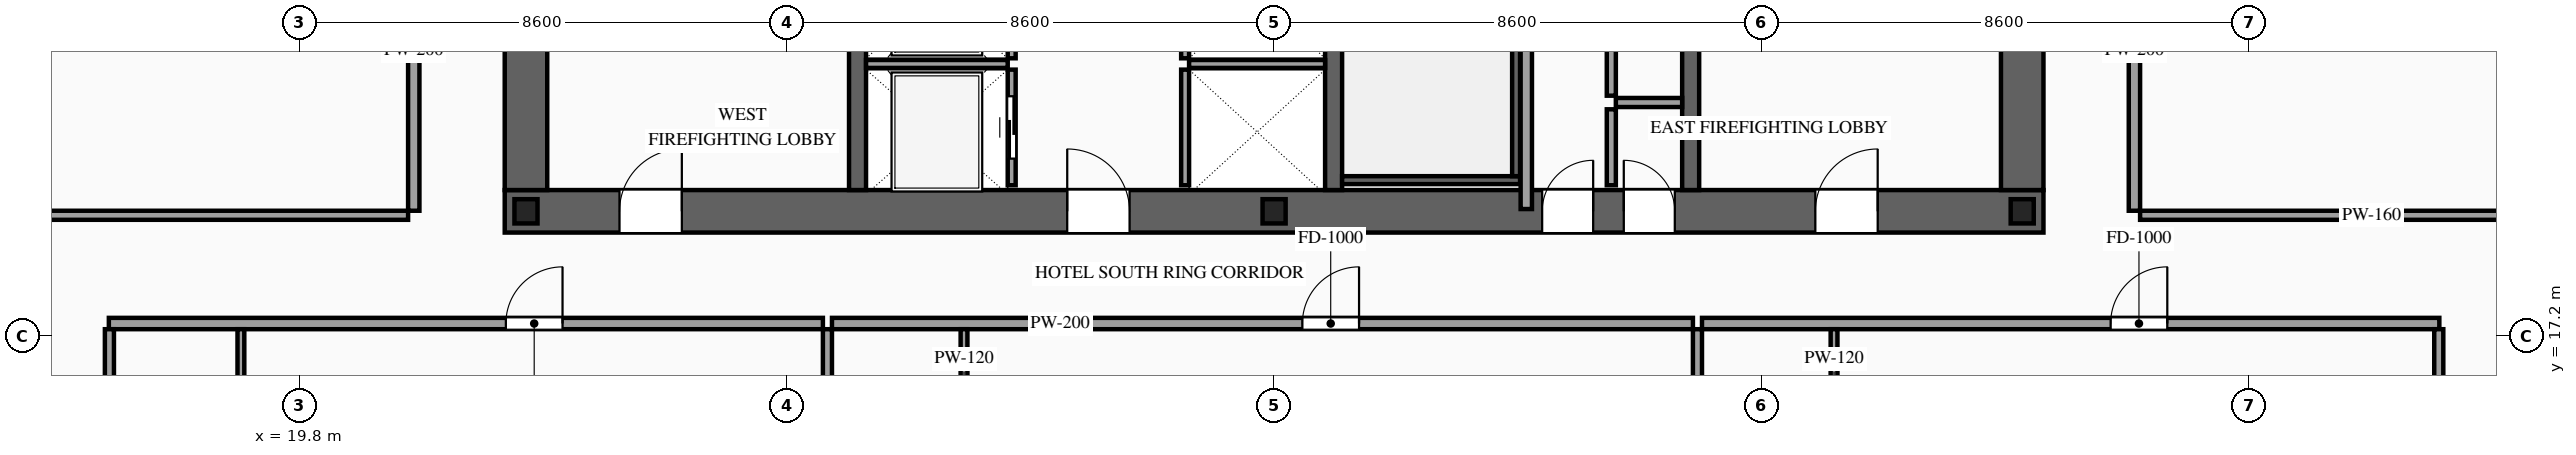
"""IFC4 building model, lengths in metres.
Left out: names, types, materials, properties, quantities, classifications, styles, units other than length and angle.
Written with IfcOpenShell. Run it as: python <this file> out.ifc"""

import sys

from ifc_helpers import new_model, si_unit, direction, frame, frame_2d, origin, origin_2d, place, context, subcontext, project, spatial, rectangle, i_section, extrude, source, transform, mapped, element, fill, save


model = new_model("IFC4")
c1 = context("Model", 3, precision=1e-05, world=origin(), true_north=direction((0.0, 1.0)))
c2 = subcontext(c1, "Body", "Model", "MODEL_VIEW")
j1 = project(units=[si_unit("LENGTHUNIT", "METRE"), si_unit("PLANEANGLEUNIT", "RADIAN")], contexts=[c1])
p1 = place(None, origin())
s1 = spatial("IfcSite", under=j1, at=p1, CompositionType="ELEMENT")
p2 = place(p1, origin())
s2 = spatial("IfcBuilding", under=s1, at=p2, CompositionType="ELEMENT")
p3 = place(p2, frame((0.0, 0.0, 101.0)))
s3 = spatial("IfcBuildingStorey", under=s2, at=p3, CompositionType="ELEMENT", Elevation=101.0)
p4 = place(p3, frame((23.425, 19.4, 0.0), z_axis=(0.0, 0.0, 1.0), x_axis=(1.0, 0.0, 0.0)))
e1 = element("IfcWall", 1, at=p4, inside=s3, PredefinedType="SHEAR", context=c2, shape_type="SweptSolid", body=[
    extrude(rectangle(XDim=27.15, YDim=0.75, at=frame_2d((13.575, 0.0))), origin(), (0.0, 0.0, 1.0), 3.6),
])
p5 = place(p4, frame((2.025, 0.0, 0.0)))
e2 = element("IfcOpeningElement", 2, at=p5, cuts=e1, PredefinedType="OPENING", context=c2, shape_type="SweptSolid", body=[
    extrude(rectangle(XDim=1.1, YDim=2.2, at=frame_2d((0.55, 1.1))), frame((0.0, 0.39, 0.0), z_axis=(0.0, -1.0, 0.0), x_axis=(1.0, 0.0, 0.0)), (0.0, 0.0, 1.0), 0.78),
])
p6 = place(p4, frame((9.925, 0.0, 0.0)))
e3 = element("IfcOpeningElement", 3, at=p6, cuts=e1, PredefinedType="OPENING", context=c2, shape_type="SweptSolid", body=[
    extrude(rectangle(XDim=1.1, YDim=2.2, at=frame_2d((0.55, 1.1))), frame((0.0, 0.39, 0.0), z_axis=(0.0, -1.0, 0.0), x_axis=(1.0, 0.0, 0.0)), (0.0, 0.0, 1.0), 0.78),
])
p7 = place(p4, frame((23.125, 0.0, 0.0)))
e4 = element("IfcOpeningElement", 4, at=p7, cuts=e1, PredefinedType="OPENING", context=c2, shape_type="SweptSolid", body=[
    extrude(rectangle(XDim=1.1, YDim=2.2, at=frame_2d((0.55, 1.1))), frame((0.0, 0.39, 0.0), z_axis=(0.0, -1.0, 0.0), x_axis=(1.0, 0.0, 0.0)), (0.0, 0.0, 1.0), 0.78),
])
p8 = place(p4, frame((19.745, 0.0, 0.0)))
e5 = element("IfcOpeningElement", 5, at=p8, cuts=e1, PredefinedType="OPENING", context=c2, shape_type="SweptSolid", body=[
    extrude(rectangle(XDim=0.9, YDim=2.15, at=frame_2d((0.45, 1.075))), frame((0.0, 0.39, 0.0), z_axis=(0.0, -1.0, 0.0), x_axis=(1.0, 0.0, 0.0)), (0.0, 0.0, 1.0), 0.78),
])
p9 = place(p4, frame((18.305, 0.0, 0.0)))
e6 = element("IfcOpeningElement", 6, at=p9, cuts=e1, PredefinedType="OPENING", context=c2, shape_type="SweptSolid", body=[
    extrude(rectangle(XDim=0.9, YDim=2.15, at=frame_2d((0.45, 1.075))), frame((0.0, 0.39, 0.0), z_axis=(0.0, -1.0, 0.0), x_axis=(1.0, 0.0, 0.0)), (0.0, 0.0, 1.0), 0.78),
])
m1 = source(origin(), c2, "Body", "SweptSolid", [
    extrude(rectangle(XDim=12.05, YDim=0.75, at=frame_2d((6.025, 0.0))), origin(), (0.0, 0.0, 1.0), 3.6),
])
for number, where, z_axis, x_axis in (
    (7, (23.8, 19.775, 0.0), (0.0, 0.0, 1.0), (0.0, 1.0, 0.0)),
    (8, (50.2, 19.775, 0.0), (0.0, 0.0, 1.0), (0.0, 1.0, 0.0)),
):
    element("IfcWall", number, at=place(p3, frame(where, z_axis=z_axis, x_axis=x_axis)), inside=s3, PredefinedType="SHEAR", context=c2, shape_type="MappedRepresentation", body=[
        mapped(m1, transform((0.0, 0.0, 0.0), scale=1.0)),
    ])
m2 = source(origin(), c2, "Body", "SweptSolid", [
    extrude(rectangle(XDim=12.05, YDim=0.3, at=frame_2d((6.025, 0.0))), origin(), (0.0, 0.0, 1.0), 3.6),
])
for number, where, z_axis, x_axis in (
    (9, (29.65, 19.775, 0.0), (0.0, 0.0, 1.0), (0.0, 1.0, 0.0)),
    (10, (38.05, 19.775, 0.0), (0.0, 0.0, 1.0), (0.0, 1.0, 0.0)),
    (11, (44.35, 19.775, 0.0), (0.0, 0.0, 1.0), (0.0, 1.0, 0.0)),
):
    element("IfcWall", number, at=place(p3, frame(where, z_axis=z_axis, x_axis=x_axis)), inside=s3, PredefinedType="SOLIDWALL", context=c2, shape_type="MappedRepresentation", body=[
        mapped(m2, transform((0.0, 0.0, 0.0), scale=1.0)),
    ])
m3 = source(origin(), c2, "Body", "SweptSolid", [
    extrude(i_section(OverallWidth=0.407, OverallDepth=0.428, WebThickness=0.02, FlangeThickness=0.035, at=origin_2d()), origin(), (0.0, 0.0, 1.0), 3.6),
])
for number, where, z_axis, x_axis in (
    (12, (23.8, 19.4, 0.0), (0.0, 0.0, 1.0), (1.0, 0.0, 0.0)),
    (13, (37.0, 19.4, 0.0), (0.0, 0.0, 1.0), (1.0, 0.0, 0.0)),
    (14, (50.2, 19.4, 0.0), (0.0, 0.0, 1.0), (1.0, 0.0, 0.0)),
):
    element("IfcColumn", number, at=place(p3, frame(where, z_axis=z_axis, x_axis=x_axis)), inside=s3, PredefinedType="COLUMN", context=c2, shape_type="MappedRepresentation", body=[
        mapped(m3, transform((0.0, 0.0, 0.0), scale=1.0)),
    ])
p10 = place(p3, frame((32.37, 19.86, 0.0), z_axis=(0.0, 0.0, 1.0), x_axis=(0.0, 1.0, 0.0)))
e15 = element("IfcWall", 15, at=p10, inside=s3, PredefinedType="SOLIDWALL", context=c2, shape_type="SweptSolid", body=[
    extrude(rectangle(XDim=2.04, YDim=0.14, at=frame_2d((1.02, 0.0))), origin(), (0.0, 0.0, 1.0), 3.38),
])
p11 = place(p10, frame((0.47, 0.0, 0.0)))
e16 = element("IfcOpeningElement", 16, at=p11, cuts=e15, PredefinedType="OPENING", context=c2, shape_type="SweptSolid", body=[
    extrude(rectangle(XDim=1.1, YDim=2.2, at=frame_2d((0.55, 1.1))), frame((0.0, 0.085, 0.0), z_axis=(0.0, -1.0, 0.0), x_axis=(1.0, 0.0, 0.0)), (0.0, 0.0, 1.0), 0.17),
])
m4 = source(origin(), c2, "Body", "SweptSolid", [
    extrude(rectangle(XDim=2.5, YDim=0.14, at=frame_2d((1.25, 0.0))), origin(), (0.0, 0.0, 1.0), 3.38),
])
p12 = place(p3, frame((29.8, 22.0, 0.0), z_axis=(0.0, 0.0, 1.0), x_axis=(1.0, 0.0, 0.0)))
e17 = element("IfcWall", 17, at=p12, inside=s3, PredefinedType="SOLIDWALL", context=c2, shape_type="MappedRepresentation", body=[
    mapped(m4, transform((0.0, 0.0, 0.0), scale=1.0)),
])
p13 = place(p3, frame((32.37, 22.1, 0.0), z_axis=(0.0, 0.0, 1.0), x_axis=(0.0, 1.0, 0.0)))
e18 = element("IfcWall", 18, at=p13, inside=s3, PredefinedType="SOLIDWALL", context=c2, shape_type="SweptSolid", body=[
    extrude(rectangle(XDim=2.2, YDim=0.14, at=frame_2d((1.1, 0.0))), origin(), (0.0, 0.0, 1.0), 3.38),
])
p14 = place(p13, frame((0.55, 0.0, 0.0)))
e19 = element("IfcOpeningElement", 19, at=p14, cuts=e18, PredefinedType="OPENING", context=c2, shape_type="SweptSolid", body=[
    extrude(rectangle(XDim=1.1, YDim=2.2, at=frame_2d((0.55, 1.1))), frame((0.0, 0.085, 0.0), z_axis=(0.0, -1.0, 0.0), x_axis=(1.0, 0.0, 0.0)), (0.0, 0.0, 1.0), 0.17),
])
m5 = source(origin(), c2, "Body", "SweptSolid", [
    extrude(rectangle(XDim=2.04, YDim=0.14, at=frame_2d((1.02, 0.0))), origin(), (0.0, 0.0, 1.0), 3.38),
])
p15 = place(p3, frame((35.43, 19.86, 0.0), z_axis=(0.0, 0.0, 1.0), x_axis=(0.0, 1.0, 0.0)))
e20 = element("IfcWall", 20, at=p15, inside=s3, PredefinedType="SOLIDWALL", context=c2, shape_type="MappedRepresentation", body=[
    mapped(m5, transform((0.0, 0.0, 0.0), scale=1.0)),
])
m6 = source(origin(), c2, "Body", "SweptSolid", [
    extrude(rectangle(XDim=2.4, YDim=0.14, at=frame_2d((1.2, 0.0))), origin(), (0.0, 0.0, 1.0), 3.38),
])
p16 = place(p3, frame((35.5, 22.0, 0.0), z_axis=(0.0, 0.0, 1.0), x_axis=(1.0, 0.0, 0.0)))
e21 = element("IfcWall", 21, at=p16, inside=s3, PredefinedType="SOLIDWALL", context=c2, shape_type="MappedRepresentation", body=[
    mapped(m6, transform((0.0, 0.0, 0.0), scale=1.0)),
])
m7 = source(origin(), c2, "Body", "SweptSolid", [
    extrude(rectangle(XDim=2.2, YDim=0.14, at=frame_2d((1.1, 0.0))), origin(), (0.0, 0.0, 1.0), 3.38),
])
p17 = place(p3, frame((35.43, 22.1, 0.0), z_axis=(0.0, 0.0, 1.0), x_axis=(0.0, 1.0, 0.0)))
e22 = element("IfcWall", 22, at=p17, inside=s3, PredefinedType="SOLIDWALL", context=c2, shape_type="MappedRepresentation", body=[
    mapped(m7, transform((0.0, 0.0, 0.0), scale=1.0)),
])
m8 = source(origin(), c2, "Body", "SweptSolid", [
    extrude(rectangle(XDim=3.14, YDim=0.14, at=frame_2d((1.57, 0.0))), origin(), (0.0, 0.0, 1.0), 3.38),
])
p18 = place(p3, frame((38.2, 19.95, 0.0), z_axis=(0.0, 0.0, 1.0), x_axis=(1.0, 0.0, 0.0)))
e23 = element("IfcWall", 23, at=p18, inside=s3, PredefinedType="SOLIDWALL", context=c2, shape_type="MappedRepresentation", body=[
    mapped(m8, transform((0.0, 0.0, 0.0), scale=1.0)),
])
m9 = source(origin(), c2, "Body", "SweptSolid", [
    extrude(rectangle(XDim=8.94, YDim=0.14, at=frame_2d((4.47, 0.0))), origin(), (0.0, 0.0, 1.0), 3.38),
])
p19 = place(p3, frame((41.27, 20.02, 0.0), z_axis=(0.0, 0.0, 1.0), x_axis=(0.0, 1.0, 0.0)))
e24 = element("IfcWall", 24, at=p19, inside=s3, PredefinedType="SOLIDWALL", context=c2, shape_type="MappedRepresentation", body=[
    mapped(m9, transform((0.0, 0.0, 0.0), scale=1.0)),
])
m10 = source(origin(), c2, "Body", "SweptSolid", [
    extrude(rectangle(XDim=1.34, YDim=0.16, at=frame_2d((0.67, 0.0))), origin(), (0.0, 0.0, 1.0), 3.38),
])
p20 = place(p3, frame((42.95, 19.86, 0.0), z_axis=(0.0, 0.0, 1.0), x_axis=(0.0, 1.0, 0.0)))
e25 = element("IfcWall", 25, at=p20, inside=s3, PredefinedType="PARTITIONING", context=c2, shape_type="MappedRepresentation", body=[
    mapped(m10, transform((0.0, 0.0, 0.0), scale=1.0)),
])
m11 = source(origin(), c2, "Body", "SweptSolid", [
    extrude(rectangle(XDim=1.17, YDim=0.16, at=frame_2d((0.585, 0.0))), origin(), (0.0, 0.0, 1.0), 3.38),
])
p21 = place(p3, frame((43.03, 21.32, 0.0), z_axis=(0.0, 0.0, 1.0), x_axis=(1.0, 0.0, 0.0)))
e26 = element("IfcWall", 26, at=p21, inside=s3, PredefinedType="PARTITIONING", context=c2, shape_type="MappedRepresentation", body=[
    mapped(m11, transform((0.0, 0.0, 0.0), scale=1.0)),
])
m12 = source(origin(), c2, "Body", "SweptSolid", [
    extrude(rectangle(XDim=12.72, YDim=0.2, at=frame_2d((6.36, 0.0))), origin(), (0.0, 0.0, 1.0), 3.38),
])
p22 = place(p3, frame((41.45, 19.44, 0.0), z_axis=(0.0, 0.0, 1.0), x_axis=(0.0, 1.0, 0.0)))
e27 = element("IfcWall", 27, at=p22, inside=s3, PredefinedType="PARTITIONING", context=c2, shape_type="MappedRepresentation", body=[
    mapped(m12, transform((0.0, 0.0, 0.0), scale=1.0)),
])
m13 = source(origin(), c2, "Body", "SweptSolid", [
    extrude(rectangle(XDim=10.72, YDim=0.16, at=frame_2d((5.36, 0.0))), origin(), (0.0, 0.0, 1.0), 3.38),
])
p23 = place(p3, frame((42.95, 21.44, 0.0), z_axis=(0.0, 0.0, 1.0), x_axis=(0.0, 1.0, 0.0)))
e28 = element("IfcWall", 28, at=p23, inside=s3, PredefinedType="PARTITIONING", context=c2, shape_type="MappedRepresentation", body=[
    mapped(m13, transform((0.0, 0.0, 0.0), scale=1.0)),
])
p24 = place(p3, frame((16.44, 17.42, 0.0), z_axis=(0.0, 0.0, 1.0), x_axis=(1.0, 0.0, 0.0)))
e29 = element("IfcWall", 29, at=p24, inside=s3, PredefinedType="PARTITIONING", context=c2, shape_type="SweptSolid", body=[
    extrude(rectangle(XDim=12.599, YDim=0.2, at=frame_2d((6.3, 0.0))), origin(), (0.0, 0.0, 1.0), 3.38),
])
p25 = place(p24, frame((7.005, 0.0, 0.0)))
e30 = element("IfcOpeningElement", 30, at=p25, cuts=e29, PredefinedType="OPENING", context=c2, shape_type="SweptSolid", body=[
    extrude(rectangle(XDim=1.0, YDim=2.2, at=frame_2d((0.5, 1.1))), frame((0.0, 0.115, 0.0), z_axis=(0.0, -1.0, 0.0), x_axis=(1.0, 0.0, 0.0)), (0.0, 0.0, 1.0), 0.23),
])
m14 = source(origin(), c2, "Body", "SweptSolid", [
    extrude(rectangle(XDim=14.97, YDim=0.16, at=frame_2d((7.485, 0.0))), origin(), (0.0, 0.0, 1.0), 3.38),
])
p26 = place(p3, frame((29.119, 2.35, 0.0), z_axis=(0.0, 0.0, 1.0), x_axis=(0.0, 1.0, 0.0)))
e31 = element("IfcWall", 31, at=p26, inside=s3, PredefinedType="PARTITIONING", context=c2, shape_type="MappedRepresentation", body=[
    mapped(m14, transform((0.0, 0.0, 0.0), scale=1.0)),
])
m15 = source(origin(), c2, "Body", "SweptSolid", [
    extrude(rectangle(XDim=2.42, YDim=0.12, at=frame_2d((1.21, 0.0))), origin(), (0.0, 0.0, 1.0), 3.38),
])
p27 = place(p3, frame((18.77, 14.9, 0.0), z_axis=(0.0, 0.0, 1.0), x_axis=(0.0, 1.0, 0.0)))
e32 = element("IfcWall", 32, at=p27, inside=s3, PredefinedType="PARTITIONING", context=c2, shape_type="MappedRepresentation", body=[
    mapped(m15, transform((0.0, 0.0, 0.0), scale=1.0)),
])
p28 = place(p3, frame((29.199, 17.42, 0.0), z_axis=(0.0, 0.0, 1.0), x_axis=(1.0, 0.0, 0.0)))
e33 = element("IfcWall", 33, at=p28, inside=s3, PredefinedType="PARTITIONING", context=c2, shape_type="SweptSolid", body=[
    extrude(rectangle(XDim=15.191, YDim=0.2, at=frame_2d((7.595, 0.0))), origin(), (0.0, 0.0, 1.0), 3.38),
])
p29 = place(p28, frame((8.3, 0.0, 0.0)))
e34 = element("IfcOpeningElement", 34, at=p29, cuts=e33, PredefinedType="OPENING", context=c2, shape_type="SweptSolid", body=[
    extrude(rectangle(XDim=1.0, YDim=2.2, at=frame_2d((0.5, 1.1))), frame((0.0, 0.115, 0.0), z_axis=(0.0, -1.0, 0.0), x_axis=(1.0, 0.0, 0.0)), (0.0, 0.0, 1.0), 0.23),
])
p30 = place(p3, frame((44.47, 2.35, 0.0), z_axis=(0.0, 0.0, 1.0), x_axis=(0.0, 1.0, 0.0)))
e35 = element("IfcWall", 35, at=p30, inside=s3, PredefinedType="PARTITIONING", context=c2, shape_type="MappedRepresentation", body=[
    mapped(m14, transform((0.0, 0.0, 0.0), scale=1.0)),
])
p31 = place(p3, frame((31.529, 14.9, 0.0), z_axis=(0.0, 0.0, 1.0), x_axis=(0.0, 1.0, 0.0)))
e36 = element("IfcWall", 36, at=p31, inside=s3, PredefinedType="PARTITIONING", context=c2, shape_type="MappedRepresentation", body=[
    mapped(m15, transform((0.0, 0.0, 0.0), scale=1.0)),
])
p32 = place(p3, frame((44.55, 17.42, 0.0), z_axis=(0.0, 0.0, 1.0), x_axis=(1.0, 0.0, 0.0)))
e37 = element("IfcWall", 37, at=p32, inside=s3, PredefinedType="PARTITIONING", context=c2, shape_type="SweptSolid", body=[
    extrude(rectangle(XDim=13.01, YDim=0.2, at=frame_2d((6.505, 0.0))), origin(), (0.0, 0.0, 1.0), 3.38),
])
p33 = place(p32, frame((7.21, 0.0, 0.0)))
e38 = element("IfcOpeningElement", 38, at=p33, cuts=e37, PredefinedType="OPENING", context=c2, shape_type="SweptSolid", body=[
    extrude(rectangle(XDim=1.0, YDim=2.2, at=frame_2d((0.5, 1.1))), frame((0.0, 0.115, 0.0), z_axis=(0.0, -1.0, 0.0), x_axis=(1.0, 0.0, 0.0)), (0.0, 0.0, 1.0), 0.23),
])
m16 = source(origin(), c2, "Body", "SweptSolid", [
    extrude(rectangle(XDim=14.82, YDim=0.16, at=frame_2d((7.41, 0.0))), origin(), (0.0, 0.0, 1.0), 3.38),
])
for number, where, z_axis, x_axis in (
    (39, (16.45, 2.5, 0.0), (0.0, 0.0, 1.0), (0.0, 1.0, 0.0)),
    (40, (57.55, 2.5, 0.0), (0.0, 0.0, 1.0), (0.0, 1.0, 0.0)),
):
    element("IfcWall", number, at=place(p3, frame(where, z_axis=z_axis, x_axis=x_axis)), inside=s3, PredefinedType="PARTITIONING", context=c2, shape_type="MappedRepresentation", body=[
        mapped(m16, transform((0.0, 0.0, 0.0), scale=1.0)),
    ])
p34 = place(p3, frame((46.88, 14.9, 0.0), z_axis=(0.0, 0.0, 1.0), x_axis=(0.0, 1.0, 0.0)))
e41 = element("IfcWall", 41, at=p34, inside=s3, PredefinedType="PARTITIONING", context=c2, shape_type="MappedRepresentation", body=[
    mapped(m15, transform((0.0, 0.0, 0.0), scale=1.0)),
])
p35 = place(p3, frame((21.82, 19.41, 0.0), z_axis=(0.0, 0.0, 1.0), x_axis=(0.0, 1.0, 0.0)))
e42 = element("IfcWall", 42, at=p35, inside=s3, PredefinedType="PARTITIONING", context=c2, shape_type="SweptSolid", body=[
    extrude(rectangle(XDim=12.78, YDim=0.2, at=frame_2d((6.39, 0.0))), origin(), (0.0, 0.0, 1.0), 3.38),
])
p36 = place(p35, frame((5.89, 0.0, 0.0)))
e43 = element("IfcOpeningElement", 43, at=p36, cuts=e42, PredefinedType="OPENING", context=c2, shape_type="SweptSolid", body=[
    extrude(rectangle(XDim=1.0, YDim=2.2, at=frame_2d((0.5, 1.1))), frame((0.0, 0.115, 0.0), z_axis=(0.0, -1.0, 0.0), x_axis=(1.0, 0.0, 0.0)), (0.0, 0.0, 1.0), 0.23),
])
m17 = source(origin(), c2, "Body", "SweptSolid", [
    extrude(rectangle(XDim=8.17, YDim=0.16, at=frame_2d((4.085, 0.0))), origin(), (0.0, 0.0, 1.0), 2.875),
])
p37 = place(p3, frame((13.55, 19.33, 0.0), z_axis=(0.0, 0.0, 1.0), x_axis=(1.0, 0.0, 0.0)))
e44 = element("IfcWall", 44, at=p37, inside=s3, PredefinedType="PARTITIONING", context=c2, shape_type="MappedRepresentation", body=[
    mapped(m17, transform((0.0, 0.0, 0.0), scale=1.0)),
])
p38 = place(p3, frame((52.18, 19.41, 0.0), z_axis=(0.0, 0.0, 1.0), x_axis=(0.0, 1.0, 0.0)))
e45 = element("IfcWall", 45, at=p38, inside=s3, PredefinedType="PARTITIONING", context=c2, shape_type="SweptSolid", body=[
    extrude(rectangle(XDim=12.78, YDim=0.2, at=frame_2d((6.39, 0.0))), origin(), (0.0, 0.0, 1.0), 3.38),
])
p39 = place(p38, frame((5.89, 0.0, 0.0)))
e46 = element("IfcOpeningElement", 46, at=p39, cuts=e45, PredefinedType="OPENING", context=c2, shape_type="SweptSolid", body=[
    extrude(rectangle(XDim=1.0, YDim=2.2, at=frame_2d((0.5, 1.1))), frame((0.0, 0.115, 0.0), z_axis=(0.0, -1.0, 0.0), x_axis=(1.0, 0.0, 0.0)), (0.0, 0.0, 1.0), 0.23),
])
p40 = place(p3, frame((52.28, 19.33, 0.0), z_axis=(0.0, 0.0, 1.0), x_axis=(1.0, 0.0, 0.0)))
e47 = element("IfcWall", 47, at=p40, inside=s3, PredefinedType="PARTITIONING", context=c2, shape_type="MappedRepresentation", body=[
    mapped(m17, transform((0.0, 0.0, 0.0), scale=1.0)),
])
m18 = source(origin(), c2, "Body", "SweptSolid", [
    extrude(rectangle(XDim=1.1, YDim=2.2, at=frame_2d((0.55, 1.1))), frame((0.0, 0.025, 0.0), z_axis=(0.0, -1.0, 0.0), x_axis=(1.0, 0.0, 0.0)), (0.0, 0.0, 1.0), 0.05),
])
p41 = place(p11, origin())
e48 = element("IfcDoor", 48, at=p41, inside=s3, OperationType="SLIDING_TO_LEFT", PredefinedType="DOOR", context=c2, shape_type="MappedRepresentation", body=[
    mapped(m18, transform((0.0, 0.0, 0.0), scale=1.0)),
])
fill(e16, e48)
m19 = source(origin(), c2, "Body", "SweptSolid", [
    extrude(rectangle(XDim=1.1, YDim=2.2, at=frame_2d((0.55, 1.1))), frame((0.0, 0.025, 0.0), z_axis=(0.0, -1.0, 0.0), x_axis=(1.0, 0.0, 0.0)), (0.0, 0.0, 1.0), 0.05),
])
p42 = place(p5, origin())
e49 = element("IfcDoor", 49, at=p42, inside=s3, OperationType="SINGLE_SWING_RIGHT", PredefinedType="DOOR", context=c2, shape_type="MappedRepresentation", body=[
    mapped(m19, transform((0.0, 0.0, 0.0), scale=1.0)),
])
fill(e2, e49)
p43 = place(p6, origin())
e50 = element("IfcDoor", 50, at=p43, inside=s3, OperationType="SINGLE_SWING_LEFT", PredefinedType="DOOR", context=c2, shape_type="MappedRepresentation", body=[
    mapped(m19, transform((0.0, 0.0, 0.0), scale=1.0)),
])
fill(e3, e50)
p44 = place(p7, origin())
e51 = element("IfcDoor", 51, at=p44, inside=s3, OperationType="SINGLE_SWING_RIGHT", PredefinedType="DOOR", context=c2, shape_type="MappedRepresentation", body=[
    mapped(m19, transform((0.0, 0.0, 0.0), scale=1.0)),
])
fill(e4, e51)
m20 = source(origin(), c2, "Body", "SweptSolid", [
    extrude(rectangle(XDim=0.9, YDim=2.15, at=frame_2d((0.45, 1.075))), frame((0.0, 0.025, 0.0), z_axis=(0.0, -1.0, 0.0), x_axis=(1.0, 0.0, 0.0)), (0.0, 0.0, 1.0), 0.05),
])
p45 = place(p8, origin())
e52 = element("IfcDoor", 52, at=p45, inside=s3, OperationType="SINGLE_SWING_LEFT", PredefinedType="DOOR", context=c2, shape_type="MappedRepresentation", body=[
    mapped(m20, transform((0.0, 0.0, 0.0), scale=1.0)),
])
fill(e5, e52)
p46 = place(p9, origin())
e53 = element("IfcDoor", 53, at=p46, inside=s3, OperationType="SINGLE_SWING_RIGHT", PredefinedType="DOOR", context=c2, shape_type="MappedRepresentation", body=[
    mapped(m20, transform((0.0, 0.0, 0.0), scale=1.0)),
])
fill(e6, e53)
m21 = source(origin(), c2, "Body", "SweptSolid", [
    extrude(rectangle(XDim=1.0, YDim=2.2, at=frame_2d((0.5, 1.1))), frame((0.0, 0.025, 0.0), z_axis=(0.0, -1.0, 0.0), x_axis=(1.0, 0.0, 0.0)), (0.0, 0.0, 1.0), 0.05),
])
p47 = place(p25, origin())
e54 = element("IfcDoor", 54, at=p47, inside=s3, OperationType="SINGLE_SWING_RIGHT", PredefinedType="DOOR", context=c2, shape_type="MappedRepresentation", body=[
    mapped(m21, transform((0.0, 0.0, 0.0), scale=1.0)),
])
fill(e30, e54)
p48 = place(p29, origin())
e55 = element("IfcDoor", 55, at=p48, inside=s3, OperationType="SINGLE_SWING_RIGHT", PredefinedType="DOOR", context=c2, shape_type="MappedRepresentation", body=[
    mapped(m21, transform((0.0, 0.0, 0.0), scale=1.0)),
])
fill(e34, e55)
p49 = place(p33, origin())
e56 = element("IfcDoor", 56, at=p49, inside=s3, OperationType="SINGLE_SWING_RIGHT", PredefinedType="DOOR", context=c2, shape_type="MappedRepresentation", body=[
    mapped(m21, transform((0.0, 0.0, 0.0), scale=1.0)),
])
fill(e38, e56)
save(model, sys.argv[1])
